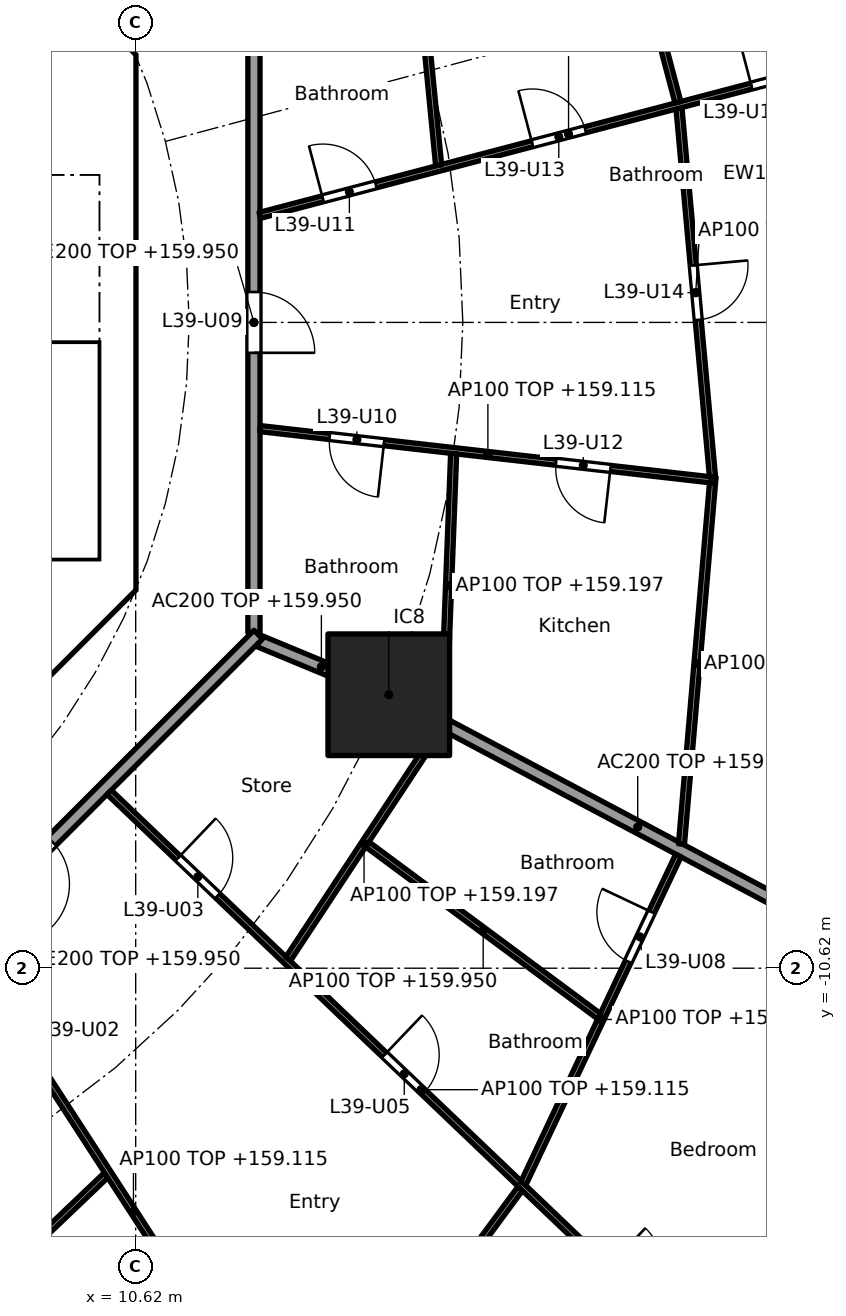
"""IFC4 building model, lengths in metres.
Left out: names, types, materials, properties, quantities, classifications, styles, units other than length and angle.
Written with IfcOpenShell. Run it as: python <this file> out.ifc"""

import sys

from ifc_helpers import new_model, si_unit, direction, frame, frame_2d, origin, origin_2d, place, context, subcontext, project, spatial, polyline, rectangle, outline, extrude, element, fill, save


model = new_model("IFC4")
c1 = context("Model", 3, precision=1e-05, world=origin(), true_north=direction((0.0, 1.0)))
c2 = subcontext(c1, "Body", "Model", "MODEL_VIEW")
j1 = project(units=[si_unit("LENGTHUNIT", "METRE"), si_unit("PLANEANGLEUNIT", "RADIAN")], contexts=[c1])
p1 = place(None, origin())
s1 = spatial("IfcSite", under=j1, at=p1, CompositionType="ELEMENT")
p2 = place(p1, origin())
s2 = spatial("IfcBuilding", under=s1, at=p2, CompositionType="ELEMENT")
p3 = place(p2, frame((0.0, 0.0, 156.6)))
s3 = spatial("IfcBuildingStorey", under=s2, at=p3, CompositionType="ELEMENT", Elevation=156.6)
p4 = place(p3, frame((14.782, -6.123, 0.0), z_axis=(0.0, 0.0, 1.0), x_axis=(1.0, 0.0, 0.0)))
e1 = element("IfcColumn", 1, at=p4, inside=s3, PredefinedType="COLUMN", context=c2, shape_type="SweptSolid", body=[
    extrude(rectangle(XDim=2.0, YDim=2.0, at=origin_2d()), origin(), (0.0, 0.0, 1.0), 3.7),
])
p5 = place(p3, frame((9.988, 4.613, 0.0), z_axis=(0.0, 0.0, 1.0), x_axis=(-0.707106781187, 0.707106781187, 0.0)))
e2 = element("IfcWall", 2, at=p5, inside=s3, PredefinedType="SHEAR", context=c2, shape_type="SweptSolid", body=[
    extrude(rectangle(XDim=7.602, YDim=0.6, at=frame_2d((3.801, 0.0))), origin(), (0.0, 0.0, 1.0), 3.35),
])
p6 = place(p5, frame((3.201, 0.0, 0.0)))
e3 = element("IfcOpeningElement", 3, at=p6, cuts=e2, PredefinedType="OPENING", context=c2, shape_type="SweptSolid", body=[
    extrude(rectangle(XDim=1.2, YDim=2.1, at=frame_2d((0.6, 1.05))), frame((0.0, 0.31, 0.0), z_axis=(0.0, -1.0, 0.0), x_axis=(1.0, 0.0, 0.0)), (0.0, 0.0, 1.0), 0.62),
])
p7 = place(p3, frame((4.613, -9.988, 0.0), z_axis=(0.0, 0.0, 1.0), x_axis=(0.707106781187, 0.707106781187, 0.0)))
e4 = element("IfcWall", 4, at=p7, inside=s3, PredefinedType="SHEAR", context=c2, shape_type="SweptSolid", body=[
    extrude(rectangle(XDim=7.602, YDim=0.6, at=frame_2d((3.801, 0.0))), origin(), (0.0, 0.0, 1.0), 3.35),
])
p8 = place(p7, frame((3.201, 0.0, 0.0)))
e5 = element("IfcOpeningElement", 5, at=p8, cuts=e4, PredefinedType="OPENING", context=c2, shape_type="SweptSolid", body=[
    extrude(rectangle(XDim=1.2, YDim=2.1, at=frame_2d((0.6, 1.05))), frame((0.0, 0.31, 0.0), z_axis=(0.0, -1.0, 0.0), x_axis=(1.0, 0.0, 0.0)), (0.0, 0.0, 1.0), 0.62),
])
p9 = place(p3, frame((6.7, 4.0, 0.0), z_axis=(0.0, 0.0, 1.0), x_axis=(1.0, 0.0, 0.0)))
e6 = element("IfcWall", 6, at=p9, inside=s3, PredefinedType="SOLIDWALL", context=c2, shape_type="SweptSolid", body=[
    extrude(rectangle(XDim=3.325, YDim=0.2, at=frame_2d((1.662, 0.0))), origin(), (0.0, 0.0, 1.0), 3.35),
])
p10 = place(p9, frame((1.25, 0.0, 0.0)))
e7 = element("IfcOpeningElement", 7, at=p10, cuts=e6, PredefinedType="OPENING", context=c2, shape_type="SweptSolid", body=[
    extrude(rectangle(XDim=1.1, YDim=2.1, at=frame_2d((0.55, 1.05))), frame((0.0, 0.11, 0.0), z_axis=(0.0, -1.0, 0.0), x_axis=(1.0, 0.0, 0.0)), (0.0, 0.0, 1.0), 0.22),
])
p11 = place(p3, origin())
e8 = element("IfcWall", 8, at=p11, inside=s3, PredefinedType="SHEAR", context=c2, shape_type="SweptSolid", body=[
    extrude(outline(polyline([(9.776, -4.401), (10.025, -4.152), (10.025, -3.801), (10.025, 4.152), (9.776, 4.401), (10.2, 4.825), (10.625, 4.401), (10.625, -4.401), (10.2, -4.825), (9.776, -4.401)])), origin(), (0.0, 0.0, 1.0), 3.35),
])
p12 = place(p3, origin())
e9 = element("IfcWall", 9, at=p12, inside=s3, PredefinedType="SOLIDWALL", context=c2, shape_type="SweptSolid", body=[
    extrude(outline(polyline([(10.025, -4.1), (6.7, -4.1), (6.7, -3.9), (10.025, -3.9), (10.025, -4.1)])), origin(), (0.0, 0.0, 1.0), 3.35),
])
p13 = place(p3, frame((6.14, -14.829, 0.0), z_axis=(0.0, 0.0, 1.0), x_axis=(0.346169582481, -0.938171956608, 0.0)))
e10 = element("IfcWall", 10, at=p13, inside=s3, PredefinedType="PARTITIONING", context=c2, shape_type="SweptSolid", body=[
    extrude(rectangle(XDim=14.354, YDim=0.2, at=frame_2d((7.177, 0.0))), origin(), (0.0, 0.0, 1.0), 2.597),
])
p14 = place(p3, frame((12.657, -5.243, 0.0), z_axis=(0.0, 0.0, 1.0), x_axis=(0.923846436004, -0.382763324632, 0.0)))
e11 = element("IfcWall", 11, at=p14, inside=s3, PredefinedType="PARTITIONING", context=c2, shape_type="SweptSolid", body=[
    extrude(rectangle(XDim=2.2, YDim=0.2, at=frame_2d((1.1, 0.0))), origin(), (0.0, 0.0, 1.0), 3.35),
])
p15 = place(p3, frame((14.826, -6.146, 0.0), z_axis=(0.0, 0.0, 1.0), x_axis=(0.883012998471, -0.469348532044, 0.0)))
e12 = element("IfcWall", 12, at=p15, inside=s3, PredefinedType="PARTITIONING", context=c2, shape_type="SweptSolid", body=[
    extrude(rectangle(XDim=9.172, YDim=0.2, at=frame_2d((4.586, 0.0))), origin(), (0.0, 0.0, 1.0), 2.597),
])
p16 = place(p3, frame((12.565, -5.104, 0.0), z_axis=(0.0, 0.0, 1.0), x_axis=(0.0, 1.0, 0.0)))
e13 = element("IfcWall", 13, at=p16, inside=s3, PredefinedType="PARTITIONING", context=c2, shape_type="SweptSolid", body=[
    extrude(rectangle(XDim=10.209, YDim=0.2, at=frame_2d((5.104, 0.0))), origin(), (0.0, 0.0, 1.0), 3.35),
])
p17 = place(p16, frame((4.604, 0.0, 0.0)))
e14 = element("IfcOpeningElement", 14, at=p17, cuts=e13, PredefinedType="OPENING", context=c2, shape_type="SweptSolid", body=[
    extrude(rectangle(XDim=1.0, YDim=2.1, at=frame_2d((0.5, 1.05))), frame((0.0, 0.11, 0.0), z_axis=(0.0, -1.0, 0.0), x_axis=(1.0, 0.0, 0.0)), (0.0, 0.0, 1.0), 0.22),
])
p18 = place(p3, frame((5.275, -12.494, 0.0), z_axis=(0.0, 0.0, 1.0), x_axis=(0.707106781187, 0.707106781187, 0.0)))
e15 = element("IfcWall", 15, at=p18, inside=s3, PredefinedType="PARTITIONING", context=c2, shape_type="SweptSolid", body=[
    extrude(rectangle(XDim=10.409, YDim=0.2, at=frame_2d((5.205, 0.0))), origin(), (0.0, 0.0, 1.0), 3.35),
])
p19 = place(p18, frame((4.604, 0.0, 0.0)))
e16 = element("IfcOpeningElement", 16, at=p19, cuts=e15, PredefinedType="OPENING", context=c2, shape_type="SweptSolid", body=[
    extrude(rectangle(XDim=1.0, YDim=2.1, at=frame_2d((0.5, 1.05))), frame((0.0, 0.11, 0.0), z_axis=(0.0, -1.0, 0.0), x_axis=(1.0, 0.0, 0.0)), (0.0, 0.0, 1.0), 0.22),
])
p20 = place(p3, frame((12.664, -1.746, 0.0), z_axis=(0.0, 0.0, 1.0), x_axis=(0.993605172276, -0.112910414164, 0.0)))
e17 = element("IfcWall", 17, at=p20, inside=s3, PredefinedType="PARTITIONING", context=c2, shape_type="SweptSolid", body=[
    extrude(rectangle(XDim=7.544, YDim=0.1, at=frame_2d((3.772, 0.0))), origin(), (0.0, 0.0, 1.0), 2.515),
])
p21 = place(p20, frame((1.154, 0.0, 0.0)))
e18 = element("IfcOpeningElement", 18, at=p21, cuts=e17, PredefinedType="OPENING", context=c2, shape_type="SweptSolid", body=[
    extrude(rectangle(XDim=0.9, YDim=2.1, at=frame_2d((0.45, 1.05))), frame((0.0, 0.06, 0.0), z_axis=(0.0, -1.0, 0.0), x_axis=(1.0, 0.0, 0.0)), (0.0, 0.0, 1.0), 0.12),
])
p22 = place(p20, frame((4.901, 0.0, 0.0)))
e19 = element("IfcOpeningElement", 19, at=p22, cuts=e17, PredefinedType="OPENING", context=c2, shape_type="SweptSolid", body=[
    extrude(rectangle(XDim=0.9, YDim=2.1, at=frame_2d((0.45, 1.05))), frame((0.0, 0.06, 0.0), z_axis=(0.0, -1.0, 0.0), x_axis=(1.0, 0.0, 0.0)), (0.0, 0.0, 1.0), 0.12),
])
p23 = place(p3, frame((15.849, -2.158, 0.0), z_axis=(0.0, 0.0, 1.0), x_axis=(-0.03838348155, -0.999263082648, 0.0)))
e20 = element("IfcWall", 20, at=p23, inside=s3, PredefinedType="PARTITIONING", context=c2, shape_type="SweptSolid", body=[
    extrude(rectangle(XDim=4.344, YDim=0.1, at=frame_2d((2.172, 0.0))), origin(), (0.0, 0.0, 1.0), 2.597),
])
p24 = place(p3, frame((20.106, -2.542, 0.0), z_axis=(0.0, 0.0, 1.0), x_axis=(-0.090571896131, 0.995889919434, 0.0)))
e21 = element("IfcWall", 21, at=p24, inside=s3, PredefinedType="PARTITIONING", context=c2, shape_type="SweptSolid", body=[
    extrude(rectangle(XDim=6.089, YDim=0.1, at=frame_2d((3.045, 0.0))), origin(), (0.0, 0.0, 1.0), 2.597),
])
p25 = place(p24, frame((2.594, 0.0, 0.0)))
e22 = element("IfcOpeningElement", 22, at=p25, cuts=e21, PredefinedType="OPENING", context=c2, shape_type="SweptSolid", body=[
    extrude(rectangle(XDim=0.9, YDim=2.1, at=frame_2d((0.45, 1.05))), frame((0.0, 0.06, 0.0), z_axis=(0.0, -1.0, 0.0), x_axis=(1.0, 0.0, 0.0)), (0.0, 0.0, 1.0), 0.12),
])
p26 = place(p3, frame((20.106, -2.642, 0.0), z_axis=(0.0, 0.0, 1.0), x_axis=(-0.085694058383, -0.996321498492, 0.0)))
e23 = element("IfcWall", 23, at=p26, inside=s3, PredefinedType="PARTITIONING", context=c2, shape_type="SweptSolid", body=[
    extrude(rectangle(XDim=5.957, YDim=0.1, at=frame_2d((2.979, 0.0))), origin(), (0.0, 0.0, 1.0), 2.597),
])
p27 = place(p3, frame((12.661, 1.76, 0.0), z_axis=(0.0, 0.0, 1.0), x_axis=(0.967120304949, 0.254319318488, 0.0)))
e24 = element("IfcWall", 24, at=p27, inside=s3, PredefinedType="PARTITIONING", context=c2, shape_type="SweptSolid", body=[
    extrude(rectangle(XDim=10.499, YDim=0.1, at=frame_2d((5.25, 0.0))), origin(), (0.0, 0.0, 1.0), 2.515),
])
p28 = place(p27, frame((1.073, 0.0, 0.0)))
e25 = element("IfcOpeningElement", 25, at=p28, cuts=e24, PredefinedType="OPENING", context=c2, shape_type="SweptSolid", body=[
    extrude(rectangle(XDim=0.9, YDim=2.1, at=frame_2d((0.45, 1.05))), frame((0.0, 0.06, 0.0), z_axis=(0.0, -1.0, 0.0), x_axis=(1.0, 0.0, 0.0)), (0.0, 0.0, 1.0), 0.12),
])
p29 = place(p27, frame((4.634, 0.0, 0.0)))
e26 = element("IfcOpeningElement", 26, at=p29, cuts=e24, PredefinedType="OPENING", context=c2, shape_type="SweptSolid", body=[
    extrude(rectangle(XDim=0.9, YDim=2.1, at=frame_2d((0.45, 1.05))), frame((0.0, 0.06, 0.0), z_axis=(0.0, -1.0, 0.0), x_axis=(1.0, 0.0, 0.0)), (0.0, 0.0, 1.0), 0.12),
])
p30 = place(p27, frame((8.361, 0.0, 0.0)))
e27 = element("IfcOpeningElement", 27, at=p30, cuts=e24, PredefinedType="OPENING", context=c2, shape_type="SweptSolid", body=[
    extrude(rectangle(XDim=0.9, YDim=2.1, at=frame_2d((0.45, 1.05))), frame((0.0, 0.06, 0.0), z_axis=(0.0, -1.0, 0.0), x_axis=(1.0, 0.0, 0.0)), (0.0, 0.0, 1.0), 0.12),
])
p31 = place(p3, frame((15.602, 2.584, 0.0), z_axis=(0.0, 0.0, 1.0), x_axis=(-0.097196343206, 0.995265226393, 0.0)))
e28 = element("IfcWall", 28, at=p31, inside=s3, PredefinedType="PARTITIONING", context=c2, shape_type="SweptSolid", body=[
    extrude(rectangle(XDim=3.856, YDim=0.1, at=frame_2d((1.928, 0.0))), origin(), (0.0, 0.0, 1.0), 2.597),
])
p32 = place(p3, frame((19.537, 3.62, 0.0), z_axis=(0.0, 0.0, 1.0), x_axis=(-0.255909310473, 0.966700793841, 0.0)))
e29 = element("IfcWall", 29, at=p32, inside=s3, PredefinedType="PARTITIONING", context=c2, shape_type="SweptSolid", body=[
    extrude(rectangle(XDim=5.609, YDim=0.1, at=frame_2d((2.804, 0.0))), origin(), (0.0, 0.0, 1.0), 2.597),
])
p33 = place(p32, frame((3.769, 0.0, 0.0)))
e30 = element("IfcOpeningElement", 30, at=p33, cuts=e29, PredefinedType="OPENING", context=c2, shape_type="SweptSolid", body=[
    extrude(rectangle(XDim=0.9, YDim=2.1, at=frame_2d((0.45, 1.05))), frame((0.0, 0.06, 0.0), z_axis=(0.0, -1.0, 0.0), x_axis=(1.0, 0.0, 0.0)), (0.0, 0.0, 1.0), 0.12),
])
p34 = place(p3, frame((7.032, -16.98, 0.0), z_axis=(0.0, 0.0, 1.0), x_axis=(0.723709759148, 0.690104473622, 0.0)))
e31 = element("IfcWall", 31, at=p34, inside=s3, PredefinedType="PARTITIONING", context=c2, shape_type="SweptSolid", body=[
    extrude(rectangle(XDim=4.286, YDim=0.1, at=frame_2d((2.143, 0.0))), origin(), (0.0, 0.0, 1.0), 2.597),
])
p35 = place(p3, frame((7.712, -10.195, 0.0), z_axis=(0.0, 0.0, 1.0), x_axis=(0.543868615753, -0.839170381269, 0.0)))
e32 = element("IfcWall", 32, at=p35, inside=s3, PredefinedType="PARTITIONING", context=c2, shape_type="SweptSolid", body=[
    extrude(rectangle(XDim=10.558, YDim=0.1, at=frame_2d((5.279, 0.0))), origin(), (0.0, 0.0, 1.0), 2.515),
])
p36 = place(p35, frame((1.81, 0.0, 0.0)))
e33 = element("IfcOpeningElement", 33, at=p36, cuts=e32, PredefinedType="OPENING", context=c2, shape_type="SweptSolid", body=[
    extrude(rectangle(XDim=0.9, YDim=2.1, at=frame_2d((0.45, 1.05))), frame((0.0, 0.06, 0.0), z_axis=(0.0, -1.0, 0.0), x_axis=(1.0, 0.0, 0.0)), (0.0, 0.0, 1.0), 0.12),
])
p37 = place(p35, frame((7.064, 0.0, 0.0)))
e34 = element("IfcOpeningElement", 34, at=p37, cuts=e32, PredefinedType="OPENING", context=c2, shape_type="SweptSolid", body=[
    extrude(rectangle(XDim=0.9, YDim=2.1, at=frame_2d((0.45, 1.05))), frame((0.0, 0.06, 0.0), z_axis=(0.0, -1.0, 0.0), x_axis=(1.0, 0.0, 0.0)), (0.0, 0.0, 1.0), 0.12),
])
p38 = place(p3, frame((13.457, -18.973, 0.0), z_axis=(0.0, 0.0, 1.0), x_axis=(0.593532053206, 0.80481035146, 0.0)))
e35 = element("IfcWall", 35, at=p38, inside=s3, PredefinedType="PARTITIONING", context=c2, shape_type="SweptSolid", body=[
    extrude(rectangle(XDim=5.876, YDim=0.1, at=frame_2d((2.938, 0.0))), origin(), (0.0, 0.0, 1.0), 2.597),
])
p39 = place(p38, frame((2.488, 0.0, 0.0)))
e36 = element("IfcOpeningElement", 36, at=p39, cuts=e35, PredefinedType="OPENING", context=c2, shape_type="SweptSolid", body=[
    extrude(rectangle(XDim=0.9, YDim=2.1, at=frame_2d((0.45, 1.05))), frame((0.0, 0.06, 0.0), z_axis=(0.0, -1.0, 0.0), x_axis=(1.0, 0.0, 0.0)), (0.0, 0.0, 1.0), 0.12),
])
p40 = place(p3, frame((10.184, -7.727, 0.0), z_axis=(0.0, 0.0, 1.0), x_axis=(0.723635100101, -0.690182759783, 0.0)))
e37 = element("IfcWall", 37, at=p40, inside=s3, PredefinedType="PARTITIONING", context=c2, shape_type="SweptSolid", body=[
    extrude(rectangle(XDim=14.173, YDim=0.1, at=frame_2d((7.086, 0.0))), origin(), (0.0, 0.0, 1.0), 2.515),
])
p41 = place(p40, frame((1.565, 0.0, 0.0)))
e38 = element("IfcOpeningElement", 38, at=p41, cuts=e37, PredefinedType="OPENING", context=c2, shape_type="SweptSolid", body=[
    extrude(rectangle(XDim=0.9, YDim=2.1, at=frame_2d((0.45, 1.05))), frame((0.0, 0.06, 0.0), z_axis=(0.0, -1.0, 0.0), x_axis=(1.0, 0.0, 0.0)), (0.0, 0.0, 1.0), 0.12),
])
p42 = place(p40, frame((6.257, 0.0, 0.0)))
e39 = element("IfcOpeningElement", 39, at=p42, cuts=e37, PredefinedType="OPENING", context=c2, shape_type="SweptSolid", body=[
    extrude(rectangle(XDim=0.9, YDim=2.1, at=frame_2d((0.45, 1.05))), frame((0.0, 0.06, 0.0), z_axis=(0.0, -1.0, 0.0), x_axis=(1.0, 0.0, 0.0)), (0.0, 0.0, 1.0), 0.12),
])
p43 = place(p40, frame((11.328, 0.0, 0.0)))
e40 = element("IfcOpeningElement", 40, at=p43, cuts=e37, PredefinedType="OPENING", context=c2, shape_type="SweptSolid", body=[
    extrude(rectangle(XDim=0.9, YDim=2.1, at=frame_2d((0.45, 1.05))), frame((0.0, 0.06, 0.0), z_axis=(0.0, -1.0, 0.0), x_axis=(1.0, 0.0, 0.0)), (0.0, 0.0, 1.0), 0.12),
])
p44 = place(p3, frame((13.127, -10.467, 0.0), z_axis=(0.0, 0.0, 1.0), x_axis=(0.550591551401, 0.83477478611, 0.0)))
e41 = element("IfcWall", 41, at=p44, inside=s3, PredefinedType="PARTITIONING", context=c2, shape_type="SweptSolid", body=[
    extrude(rectangle(XDim=4.532, YDim=0.1, at=frame_2d((2.266, 0.0))), origin(), (0.0, 0.0, 1.0), 2.597),
])
p45 = place(p3, frame((16.995, -14.158, 0.0), z_axis=(0.0, 0.0, 1.0), x_axis=(0.427436809038, 0.904045228005, 0.0)))
e42 = element("IfcWall", 42, at=p45, inside=s3, PredefinedType="PARTITIONING", context=c2, shape_type="SweptSolid", body=[
    extrude(rectangle(XDim=5.963, YDim=0.1, at=frame_2d((2.981, 0.0))), origin(), (0.0, 0.0, 1.0), 2.597),
])
p46 = place(p45, frame((4.035, 0.0, 0.0)))
e43 = element("IfcOpeningElement", 43, at=p46, cuts=e42, PredefinedType="OPENING", context=c2, shape_type="SweptSolid", body=[
    extrude(rectangle(XDim=0.9, YDim=2.1, at=frame_2d((0.45, 1.05))), frame((0.0, 0.06, 0.0), z_axis=(0.0, -1.0, 0.0), x_axis=(1.0, 0.0, 0.0)), (0.0, 0.0, 1.0), 0.12),
])
p47 = place(p3, frame((14.429, -8.583, 0.0), z_axis=(0.0, 0.0, 1.0), x_axis=(0.803162355549, -0.595760212358, 0.0)))
e44 = element("IfcWall", 44, at=p47, inside=s3, PredefinedType="PARTITIONING", context=c2, shape_type="SweptSolid", body=[
    extrude(rectangle(XDim=4.745, YDim=0.1, at=frame_2d((2.373, 0.0))), origin(), (0.0, 0.0, 1.0), 3.35),
])
p48 = place(p19, frame((1.0, 0.0, 0.0), x_axis=(-1.0, 0.0, 0.0)))
e45 = element("IfcDoor", 45, at=p48, inside=s3, OperationType="SINGLE_SWING_RIGHT", PredefinedType="DOOR", context=c2, shape_type="SweptSolid", body=[
    extrude(rectangle(XDim=1.0, YDim=2.1, at=frame_2d((0.5, 1.05))), frame((0.0, 0.025, 0.0), z_axis=(0.0, -1.0, 0.0), x_axis=(1.0, 0.0, 0.0)), (0.0, 0.0, 1.0), 0.05),
])
fill(e16, e45)
p49 = place(p41, origin())
e46 = element("IfcDoor", 46, at=p49, inside=s3, OperationType="SINGLE_SWING_LEFT", PredefinedType="DOOR", context=c2, shape_type="SweptSolid", body=[
    extrude(rectangle(XDim=0.9, YDim=2.1, at=frame_2d((0.45, 1.05))), frame((0.0, 0.025, 0.0), z_axis=(0.0, -1.0, 0.0), x_axis=(1.0, 0.0, 0.0)), (0.0, 0.0, 1.0), 0.05),
])
fill(e38, e46)
p50 = place(p42, origin())
e47 = element("IfcDoor", 47, at=p50, inside=s3, OperationType="SINGLE_SWING_LEFT", PredefinedType="DOOR", context=c2, shape_type="SweptSolid", body=[
    extrude(rectangle(XDim=0.9, YDim=2.1, at=frame_2d((0.45, 1.05))), frame((0.0, 0.025, 0.0), z_axis=(0.0, -1.0, 0.0), x_axis=(1.0, 0.0, 0.0)), (0.0, 0.0, 1.0), 0.05),
])
fill(e39, e47)
p51 = place(p46, origin())
e48 = element("IfcDoor", 48, at=p51, inside=s3, OperationType="SINGLE_SWING_RIGHT", PredefinedType="DOOR", context=c2, shape_type="SweptSolid", body=[
    extrude(rectangle(XDim=0.9, YDim=2.1, at=frame_2d((0.45, 1.05))), frame((0.0, 0.025, 0.0), z_axis=(0.0, -1.0, 0.0), x_axis=(1.0, 0.0, 0.0)), (0.0, 0.0, 1.0), 0.05),
])
fill(e43, e48)
p52 = place(p17, frame((1.0, 0.0, 0.0), x_axis=(-1.0, 0.0, 0.0)))
e49 = element("IfcDoor", 49, at=p52, inside=s3, OperationType="SINGLE_SWING_RIGHT", PredefinedType="DOOR", context=c2, shape_type="SweptSolid", body=[
    extrude(rectangle(XDim=1.0, YDim=2.1, at=frame_2d((0.5, 1.05))), frame((0.0, 0.025, 0.0), z_axis=(0.0, -1.0, 0.0), x_axis=(1.0, 0.0, 0.0)), (0.0, 0.0, 1.0), 0.05),
])
fill(e14, e49)
p53 = place(p21, frame((0.9, 0.0, 0.0), x_axis=(-1.0, 0.0, 0.0)))
e50 = element("IfcDoor", 50, at=p53, inside=s3, OperationType="SINGLE_SWING_LEFT", PredefinedType="DOOR", context=c2, shape_type="SweptSolid", body=[
    extrude(rectangle(XDim=0.9, YDim=2.1, at=frame_2d((0.45, 1.05))), frame((0.0, 0.025, 0.0), z_axis=(0.0, -1.0, 0.0), x_axis=(1.0, 0.0, 0.0)), (0.0, 0.0, 1.0), 0.05),
])
fill(e18, e50)
p54 = place(p28, origin())
e51 = element("IfcDoor", 51, at=p54, inside=s3, OperationType="SINGLE_SWING_LEFT", PredefinedType="DOOR", context=c2, shape_type="SweptSolid", body=[
    extrude(rectangle(XDim=0.9, YDim=2.1, at=frame_2d((0.45, 1.05))), frame((0.0, 0.025, 0.0), z_axis=(0.0, -1.0, 0.0), x_axis=(1.0, 0.0, 0.0)), (0.0, 0.0, 1.0), 0.05),
])
fill(e25, e51)
p55 = place(p22, frame((0.9, 0.0, 0.0), x_axis=(-1.0, 0.0, 0.0)))
e52 = element("IfcDoor", 52, at=p55, inside=s3, OperationType="SINGLE_SWING_LEFT", PredefinedType="DOOR", context=c2, shape_type="SweptSolid", body=[
    extrude(rectangle(XDim=0.9, YDim=2.1, at=frame_2d((0.45, 1.05))), frame((0.0, 0.025, 0.0), z_axis=(0.0, -1.0, 0.0), x_axis=(1.0, 0.0, 0.0)), (0.0, 0.0, 1.0), 0.05),
])
fill(e19, e52)
p56 = place(p29, origin())
e53 = element("IfcDoor", 53, at=p56, inside=s3, OperationType="SINGLE_SWING_LEFT", PredefinedType="DOOR", context=c2, shape_type="SweptSolid", body=[
    extrude(rectangle(XDim=0.9, YDim=2.1, at=frame_2d((0.45, 1.05))), frame((0.0, 0.025, 0.0), z_axis=(0.0, -1.0, 0.0), x_axis=(1.0, 0.0, 0.0)), (0.0, 0.0, 1.0), 0.05),
])
fill(e26, e53)
p57 = place(p25, frame((0.9, 0.0, 0.0), x_axis=(-1.0, 0.0, 0.0)))
e54 = element("IfcDoor", 54, at=p57, inside=s3, OperationType="SINGLE_SWING_LEFT", PredefinedType="DOOR", context=c2, shape_type="SweptSolid", body=[
    extrude(rectangle(XDim=0.9, YDim=2.1, at=frame_2d((0.45, 1.05))), frame((0.0, 0.025, 0.0), z_axis=(0.0, -1.0, 0.0), x_axis=(1.0, 0.0, 0.0)), (0.0, 0.0, 1.0), 0.05),
])
fill(e22, e54)
p58 = place(p30, origin())
e55 = element("IfcDoor", 55, at=p58, inside=s3, OperationType="SINGLE_SWING_LEFT", PredefinedType="DOOR", context=c2, shape_type="SweptSolid", body=[
    extrude(rectangle(XDim=0.9, YDim=2.1, at=frame_2d((0.45, 1.05))), frame((0.0, 0.025, 0.0), z_axis=(0.0, -1.0, 0.0), x_axis=(1.0, 0.0, 0.0)), (0.0, 0.0, 1.0), 0.05),
])
fill(e27, e55)
save(model, sys.argv[1])
